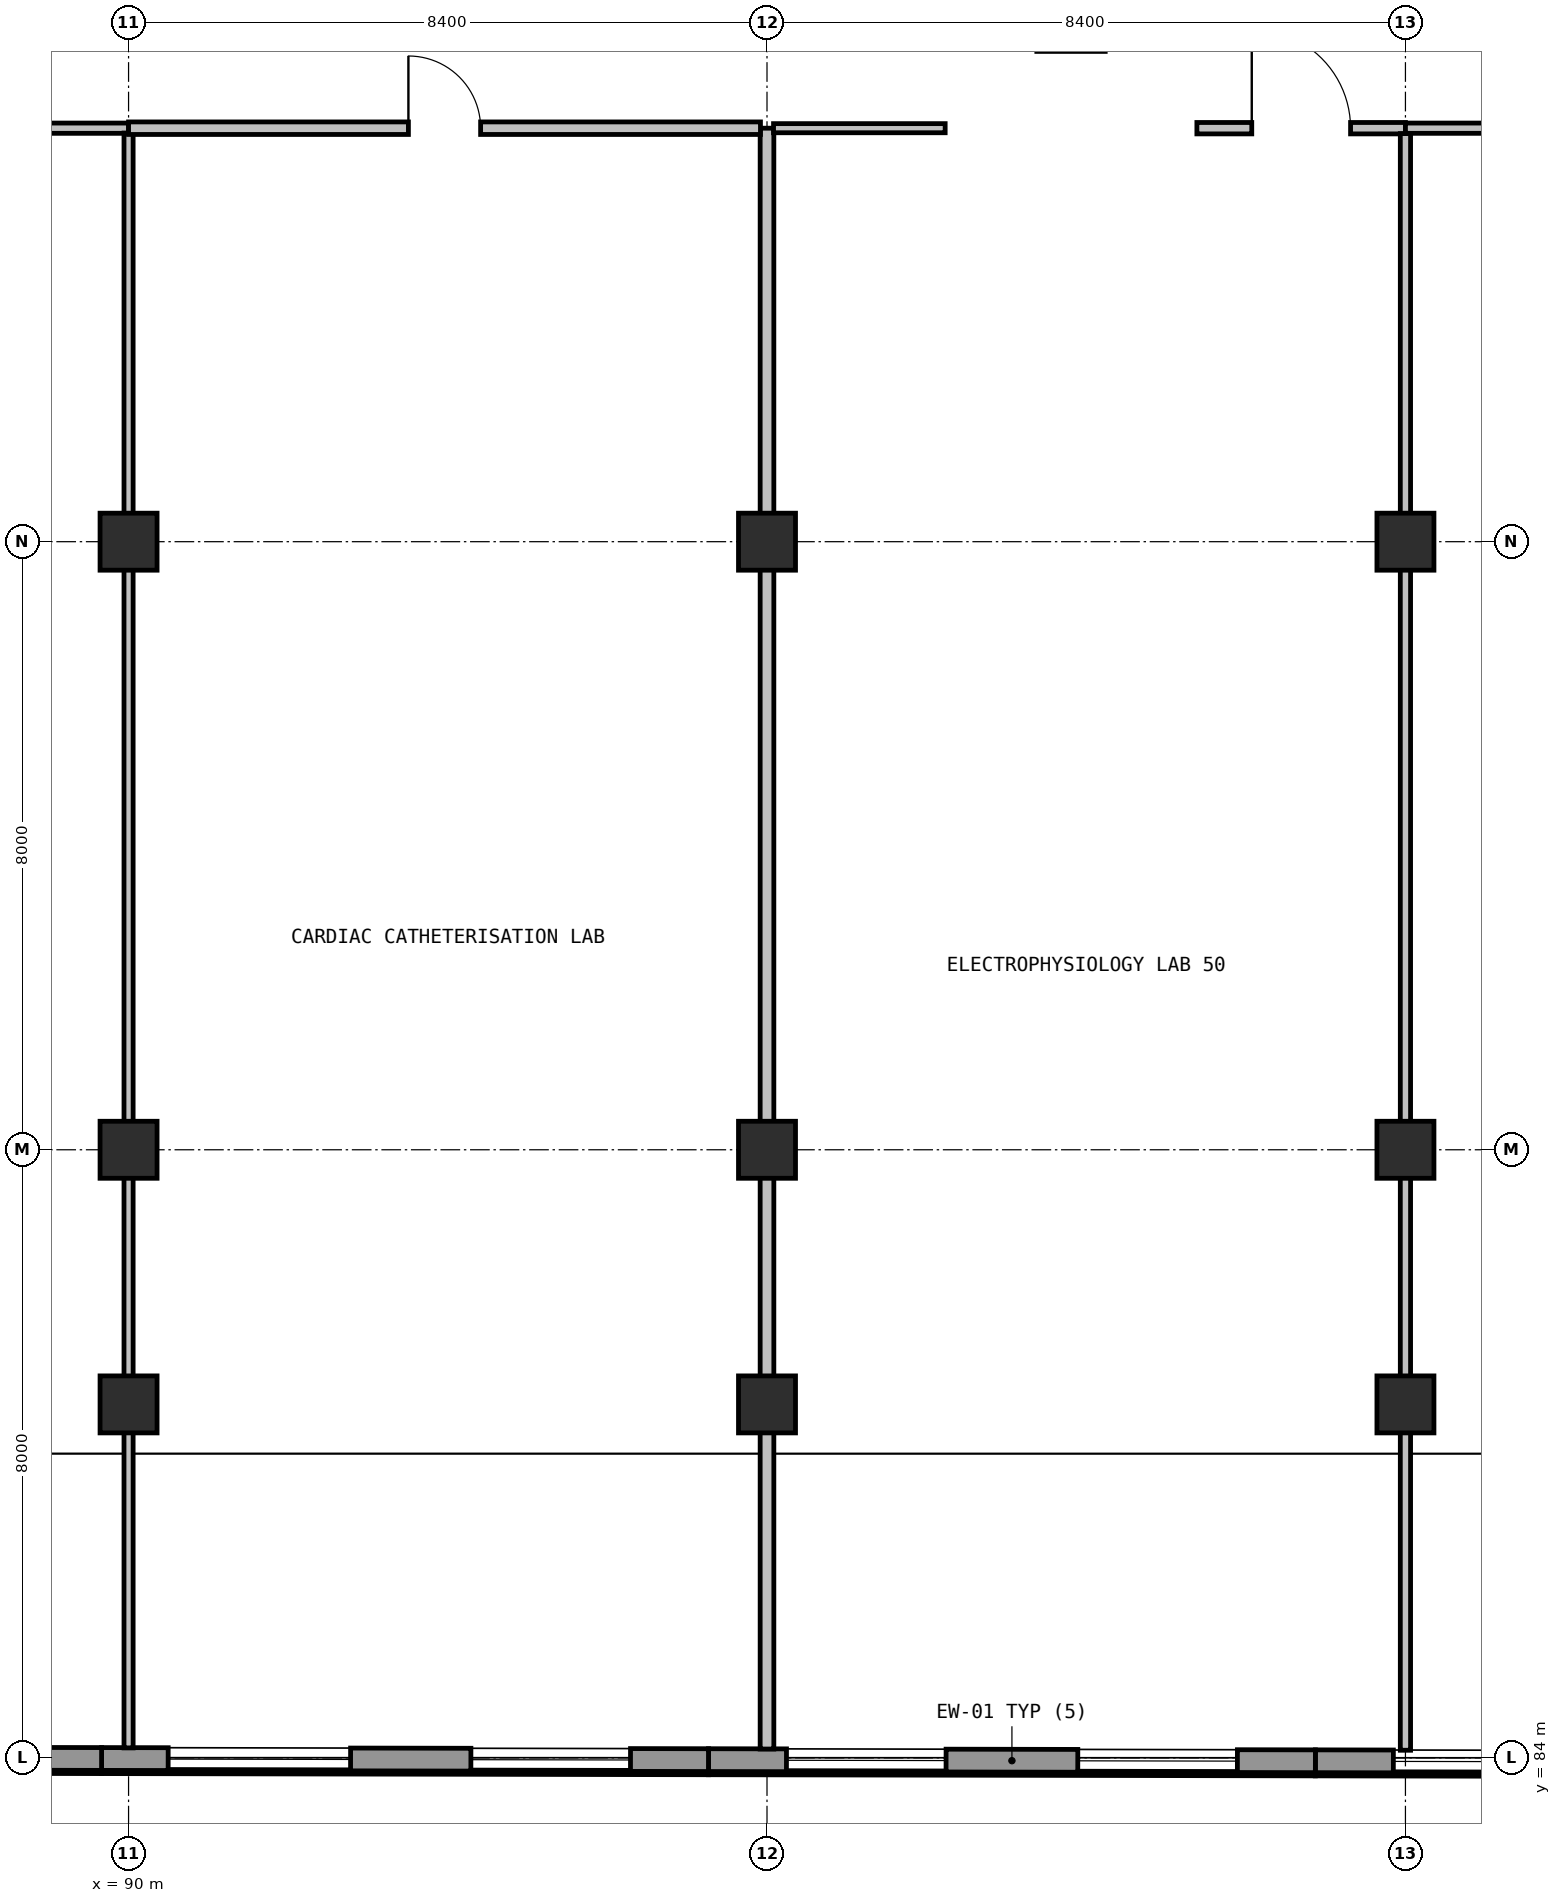
"""IFC4 building model, lengths in metres.
Left out: names, types, materials, properties, quantities, classifications, styles, units other than length and angle.
Written with IfcOpenShell. Run it as: python <this file> out.ifc"""

import sys

from ifc_helpers import new_model, si_unit, direction, frame, frame_2d, origin, origin_2d, place, context, subcontext, project, spatial, rectangle, extrude, element, fill, save


model = new_model("IFC4")
c1 = context("Model", 3, precision=1e-05, world=origin(), true_north=direction((0.0, 1.0)))
c2 = subcontext(c1, "Body", "Model", "MODEL_VIEW")
j1 = project(units=[si_unit("LENGTHUNIT", "METRE"), si_unit("PLANEANGLEUNIT", "RADIAN")], contexts=[c1])
p1 = place(None, origin())
s1 = spatial("IfcSite", under=j1, at=p1, CompositionType="ELEMENT")
p2 = place(p1, origin())
s2 = spatial("IfcBuilding", under=s1, at=p2, CompositionType="ELEMENT")
p3 = place(p2, frame((0.0, 0.0, 10.2)))
s3 = spatial("IfcBuildingStorey", under=s2, at=p3, CompositionType="ELEMENT", Elevation=10.2)
for number, where, z_axis, x_axis in (
    (1, (90.0, 88.65, 0.0), (0.0, 0.0, 1.0), (1.0, 0.0, 0.0)),
    (2, (90.0, 92.0, 0.0), (0.0, 0.0, 1.0), (1.0, 0.0, 0.0)),
    (3, (90.0, 100.0, 0.0), (0.0, 0.0, 1.0), (1.0, 0.0, 0.0)),
    (4, (98.4, 88.65, 0.0), (0.0, 0.0, 1.0), (1.0, 0.0, 0.0)),
    (5, (98.4, 92.0, 0.0), (0.0, 0.0, 1.0), (1.0, 0.0, 0.0)),
    (6, (98.4, 100.0, 0.0), (0.0, 0.0, 1.0), (1.0, 0.0, 0.0)),
    (7, (106.8, 88.65, 0.0), (0.0, 0.0, 1.0), (1.0, 0.0, 0.0)),
    (8, (106.8, 92.0, 0.0), (0.0, 0.0, 1.0), (1.0, 0.0, 0.0)),
    (9, (106.8, 100.0, 0.0), (0.0, 0.0, 1.0), (1.0, 0.0, 0.0)),
):
    element("IfcColumn", number, at=place(p3, frame(where, z_axis=z_axis, x_axis=x_axis)), inside=s3, PredefinedType="COLUMN", context=c2, shape_type="SweptSolid", body=[
        extrude(rectangle(XDim=0.75, YDim=0.75, at=origin_2d()), origin(), (0.0, 0.0, 1.0), 4.8),
    ])
p4 = place(p3, frame((113.6, 83.94, 0.0), z_axis=(0.0, 0.0, 1.0), x_axis=(-0.99999820332, 0.001895615269, 0.0)))
e10 = element("IfcWall", 10, at=p4, inside=s3, PredefinedType="SOLIDWALL", context=c2, shape_type="SweptSolid", body=[
    extrude(rectangle(XDim=7.985, YDim=0.3, at=frame_2d((3.993, 0.0))), origin(), (0.0, 0.0, 1.0), 4.46),
])
p5 = place(p4, frame((1.026, 0.0, 0.96)))
e11 = element("IfcOpeningElement", 11, at=p5, cuts=e10, PredefinedType="OPENING", context=c2, shape_type="SweptSolid", body=[
    extrude(rectangle(XDim=2.1, YDim=1.8, at=frame_2d((1.05, 0.9))), frame((0.0, 0.16, 0.0), z_axis=(0.0, -1.0, 0.0), x_axis=(1.0, 0.0, 0.0)), (0.0, 0.0, 1.0), 0.32),
])
p6 = place(p4, frame((4.859, 0.0, 0.96)))
e12 = element("IfcOpeningElement", 12, at=p6, cuts=e10, PredefinedType="OPENING", context=c2, shape_type="SweptSolid", body=[
    extrude(rectangle(XDim=2.1, YDim=1.8, at=frame_2d((1.05, 0.9))), frame((0.0, 0.16, 0.0), z_axis=(0.0, -1.0, 0.0), x_axis=(1.0, 0.0, 0.0)), (0.0, 0.0, 1.0), 0.32),
])
p7 = place(p3, frame((105.615, 83.955, 0.0), z_axis=(0.0, 0.0, 1.0), x_axis=(-0.99999826081, 0.001865040936, 0.0)))
e13 = element("IfcWall", 13, at=p7, inside=s3, PredefinedType="SOLIDWALL", context=c2, shape_type="SweptSolid", body=[
    extrude(rectangle(XDim=7.985, YDim=0.3, at=frame_2d((3.993, 0.0))), origin(), (0.0, 0.0, 1.0), 4.46),
])
p8 = place(p7, frame((1.026, 0.0, 0.96)))
e14 = element("IfcOpeningElement", 14, at=p8, cuts=e13, PredefinedType="OPENING", context=c2, shape_type="SweptSolid", body=[
    extrude(rectangle(XDim=2.1, YDim=1.8, at=frame_2d((1.05, 0.9))), frame((0.0, 0.16, 0.0), z_axis=(0.0, -1.0, 0.0), x_axis=(1.0, 0.0, 0.0)), (0.0, 0.0, 1.0), 0.32),
])
p9 = place(p7, frame((4.859, 0.0, 0.96)))
e15 = element("IfcOpeningElement", 15, at=p9, cuts=e13, PredefinedType="OPENING", context=c2, shape_type="SweptSolid", body=[
    extrude(rectangle(XDim=2.1, YDim=1.8, at=frame_2d((1.05, 0.9))), frame((0.0, 0.16, 0.0), z_axis=(0.0, -1.0, 0.0), x_axis=(1.0, 0.0, 0.0)), (0.0, 0.0, 1.0), 0.32),
])
p10 = place(p3, frame((97.63, 83.97, 0.0), z_axis=(0.0, 0.0, 1.0), x_axis=(-0.99999820321, 0.001895673228, 0.0)))
e16 = element("IfcWall", 16, at=p10, inside=s3, PredefinedType="SOLIDWALL", context=c2, shape_type="SweptSolid", body=[
    extrude(rectangle(XDim=7.985, YDim=0.3, at=frame_2d((3.992, 0.0))), origin(), (0.0, 0.0, 1.0), 4.46),
])
p11 = place(p10, frame((1.026, 0.0, 0.96)))
e17 = element("IfcOpeningElement", 17, at=p11, cuts=e16, PredefinedType="OPENING", context=c2, shape_type="SweptSolid", body=[
    extrude(rectangle(XDim=2.1, YDim=1.8, at=frame_2d((1.05, 0.9))), frame((0.0, 0.16, 0.0), z_axis=(0.0, -1.0, 0.0), x_axis=(1.0, 0.0, 0.0)), (0.0, 0.0, 1.0), 0.32),
])
p12 = place(p10, frame((4.709, 0.0, 0.96)))
e18 = element("IfcOpeningElement", 18, at=p12, cuts=e16, PredefinedType="OPENING", context=c2, shape_type="SweptSolid", body=[
    extrude(rectangle(XDim=2.4, YDim=1.8, at=frame_2d((1.2, 0.9))), frame((0.0, 0.16, 0.0), z_axis=(0.0, -1.0, 0.0), x_axis=(1.0, 0.0, 0.0)), (0.0, 0.0, 1.0), 0.32),
])
p13 = place(p3, frame((89.645, 83.985, 0.0), z_axis=(0.0, 0.0, 1.0), x_axis=(-0.99999826081, 0.001865040936, 0.0)))
e19 = element("IfcWall", 19, at=p13, inside=s3, PredefinedType="SOLIDWALL", context=c2, shape_type="SweptSolid", body=[
    extrude(rectangle(XDim=7.985, YDim=0.3, at=frame_2d((3.993, 0.0))), origin(), (0.0, 0.0, 1.0), 4.46),
])
p14 = place(p13, frame((0.726, 0.0, 0.96)))
e20 = element("IfcOpeningElement", 20, at=p14, cuts=e19, PredefinedType="OPENING", context=c2, shape_type="SweptSolid", body=[
    extrude(rectangle(XDim=2.7, YDim=1.8, at=frame_2d((1.35, 0.9))), frame((0.0, 0.16, 0.0), z_axis=(0.0, -1.0, 0.0), x_axis=(1.0, 0.0, 0.0)), (0.0, 0.0, 1.0), 0.32),
])
p15 = place(p13, frame((4.409, 0.0, 0.96)))
e21 = element("IfcOpeningElement", 21, at=p15, cuts=e19, PredefinedType="OPENING", context=c2, shape_type="SweptSolid", body=[
    extrude(rectangle(XDim=3.0, YDim=1.8, at=frame_2d((1.5, 0.9))), frame((0.0, 0.16, 0.0), z_axis=(0.0, -1.0, 0.0), x_axis=(1.0, 0.0, 0.0)), (0.0, 0.0, 1.0), 0.32),
])
p16 = place(p3, frame((88.88, 105.44, 0.0), z_axis=(0.0, 0.0, 1.0), x_axis=(1.0, 0.0, 0.0)))
e22 = element("IfcWall", 22, at=p16, inside=s3, PredefinedType="PARTITIONING", context=c2, shape_type="SweptSolid", body=[
    extrude(rectangle(XDim=1.12, YDim=0.135, at=frame_2d((0.56, 0.0))), origin(), (0.0, 0.0, 1.0), 4.46),
])
p17 = place(p3, frame((90.0, 105.376, 0.0), z_axis=(0.0, 0.0, 1.0), x_axis=(0.0, -1.0, 0.0)))
e23 = element("IfcWall", 23, at=p17, inside=s3, PredefinedType="PARTITIONING", context=c2, shape_type="SweptSolid", body=[
    extrude(rectangle(XDim=21.245, YDim=0.12, at=frame_2d((10.623, 0.0))), origin(), (0.0, 0.0, 1.0), 3.81),
])
p18 = place(p3, frame((98.4, 105.44, 0.0), z_axis=(0.0, 0.0, 1.0), x_axis=(0.0, -1.0, 0.0)))
e24 = element("IfcWall", 24, at=p18, inside=s3, PredefinedType="PARTITIONING", context=c2, shape_type="SweptSolid", body=[
    extrude(rectangle(XDim=21.324, YDim=0.18, at=frame_2d((10.662, 0.0))), origin(), (0.0, 0.0, 1.0), 3.81),
])
p19 = place(p3, frame((90.0, 105.44, 0.0), z_axis=(0.0, 0.0, 1.0), x_axis=(1.0, 0.0, 0.0)))
e25 = element("IfcWall", 25, at=p19, inside=s3, PredefinedType="PARTITIONING", context=c2, shape_type="SweptSolid", body=[
    extrude(rectangle(XDim=8.314, YDim=0.165, at=frame_2d((4.157, 0.0))), origin(), (0.0, 0.0, 1.0), 4.46),
])
p20 = place(p19, frame((3.682, 0.0, 0.0)))
e26 = element("IfcOpeningElement", 26, at=p20, cuts=e25, PredefinedType="OPENING", context=c2, shape_type="SweptSolid", body=[
    extrude(rectangle(XDim=0.95, YDim=2.1, at=frame_2d((0.475, 1.05))), frame((0.0, 0.093, 0.0), z_axis=(0.0, -1.0, 0.0), x_axis=(1.0, 0.0, 0.0)), (0.0, 0.0, 1.0), 0.185),
])
p21 = place(p3, frame((104.056, 105.44, 0.0), z_axis=(0.0, 0.0, 1.0), x_axis=(1.0, 0.0, 0.0)))
e27 = element("IfcWall", 27, at=p21, inside=s3, PredefinedType="PARTITIONING", context=c2, shape_type="SweptSolid", body=[
    extrude(rectangle(XDim=2.744, YDim=0.15, at=frame_2d((1.372, 0.0))), origin(), (0.0, 0.0, 1.0), 4.46),
])
p22 = place(p21, frame((0.722, 0.0, 0.0)))
e28 = element("IfcOpeningElement", 28, at=p22, cuts=e27, PredefinedType="OPENING", context=c2, shape_type="SweptSolid", body=[
    extrude(rectangle(XDim=1.3, YDim=2.15, at=frame_2d((0.65, 1.075))), frame((0.0, 0.085, 0.0), z_axis=(0.0, -1.0, 0.0), x_axis=(1.0, 0.0, 0.0)), (0.0, 0.0, 1.0), 0.17),
])
p23 = place(p3, frame((106.8, 105.369, 0.0), z_axis=(0.0, 0.0, 1.0), x_axis=(0.0, -1.0, 0.0)))
e29 = element("IfcWall", 29, at=p23, inside=s3, PredefinedType="PARTITIONING", context=c2, shape_type="SweptSolid", body=[
    extrude(rectangle(XDim=21.269, YDim=0.135, at=frame_2d((10.634, 0.0))), origin(), (0.0, 0.0, 1.0), 3.81),
])
p24 = place(p3, frame((98.486, 105.44, 0.0), z_axis=(0.0, 0.0, 1.0), x_axis=(1.0, 0.0, 0.0)))
e30 = element("IfcWall", 30, at=p24, inside=s3, PredefinedType="PARTITIONING", context=c2, shape_type="SweptSolid", body=[
    extrude(rectangle(XDim=2.258, YDim=0.12, at=frame_2d((1.129, 0.0))), origin(), (0.0, 0.0, 1.0), 4.46),
])
p25 = place(p3, frame((106.8, 105.44, 0.0), z_axis=(0.0, 0.0, 1.0), x_axis=(1.0, 0.0, 0.0)))
e31 = element("IfcWall", 31, at=p25, inside=s3, PredefinedType="PARTITIONING", context=c2, shape_type="SweptSolid", body=[
    extrude(rectangle(XDim=6.744, YDim=0.135, at=frame_2d((3.372, 0.0))), origin(), (0.0, 0.0, 1.0), 4.46),
])
p26 = place(p6, origin())
e32 = element("IfcWindow", 32, at=p26, inside=s3, PartitioningType="SINGLE_PANEL", PredefinedType="WINDOW", context=c2, shape_type="SweptSolid", body=[
    extrude(rectangle(XDim=2.1, YDim=1.8, at=frame_2d((1.05, 0.9))), frame((0.0, 0.03, 0.0), z_axis=(0.0, -1.0, 0.0), x_axis=(1.0, 0.0, 0.0)), (0.0, 0.0, 1.0), 0.06),
])
fill(e12, e32)
p27 = place(p8, origin())
e33 = element("IfcWindow", 33, at=p27, inside=s3, PartitioningType="SINGLE_PANEL", PredefinedType="WINDOW", context=c2, shape_type="SweptSolid", body=[
    extrude(rectangle(XDim=2.1, YDim=1.8, at=frame_2d((1.05, 0.9))), frame((0.0, 0.03, 0.0), z_axis=(0.0, -1.0, 0.0), x_axis=(1.0, 0.0, 0.0)), (0.0, 0.0, 1.0), 0.06),
])
fill(e14, e33)
p28 = place(p9, origin())
e34 = element("IfcWindow", 34, at=p28, inside=s3, PartitioningType="SINGLE_PANEL", PredefinedType="WINDOW", context=c2, shape_type="SweptSolid", body=[
    extrude(rectangle(XDim=2.1, YDim=1.8, at=frame_2d((1.05, 0.9))), frame((0.0, 0.03, 0.0), z_axis=(0.0, -1.0, 0.0), x_axis=(1.0, 0.0, 0.0)), (0.0, 0.0, 1.0), 0.06),
])
fill(e15, e34)
p29 = place(p11, origin())
e35 = element("IfcWindow", 35, at=p29, inside=s3, PartitioningType="SINGLE_PANEL", PredefinedType="WINDOW", context=c2, shape_type="SweptSolid", body=[
    extrude(rectangle(XDim=2.1, YDim=1.8, at=frame_2d((1.05, 0.9))), frame((0.0, 0.03, 0.0), z_axis=(0.0, -1.0, 0.0), x_axis=(1.0, 0.0, 0.0)), (0.0, 0.0, 1.0), 0.06),
])
fill(e17, e35)
p30 = place(p12, origin())
e36 = element("IfcWindow", 36, at=p30, inside=s3, PartitioningType="SINGLE_PANEL", PredefinedType="WINDOW", context=c2, shape_type="SweptSolid", body=[
    extrude(rectangle(XDim=2.4, YDim=1.8, at=frame_2d((1.2, 0.9))), frame((0.0, 0.03, 0.0), z_axis=(0.0, -1.0, 0.0), x_axis=(1.0, 0.0, 0.0)), (0.0, 0.0, 1.0), 0.06),
])
fill(e18, e36)
p31 = place(p20, origin())
e37 = element("IfcDoor", 37, at=p31, inside=s3, OperationType="SINGLE_SWING_RIGHT", PredefinedType="DOOR", context=c2, shape_type="SweptSolid", body=[
    extrude(rectangle(XDim=0.95, YDim=2.1, at=frame_2d((0.475, 1.05))), frame((0.0, 0.025, 0.0), z_axis=(0.0, -1.0, 0.0), x_axis=(1.0, 0.0, 0.0)), (0.0, 0.0, 1.0), 0.05),
])
fill(e26, e37)
p32 = place(p22, origin())
e38 = element("IfcDoor", 38, at=p32, inside=s3, OperationType="SINGLE_SWING_LEFT", PredefinedType="DOOR", context=c2, shape_type="SweptSolid", body=[
    extrude(rectangle(XDim=1.3, YDim=2.15, at=frame_2d((0.65, 1.075))), frame((0.0, 0.025, 0.0), z_axis=(0.0, -1.0, 0.0), x_axis=(1.0, 0.0, 0.0)), (0.0, 0.0, 1.0), 0.05),
])
fill(e28, e38)
save(model, sys.argv[1])
